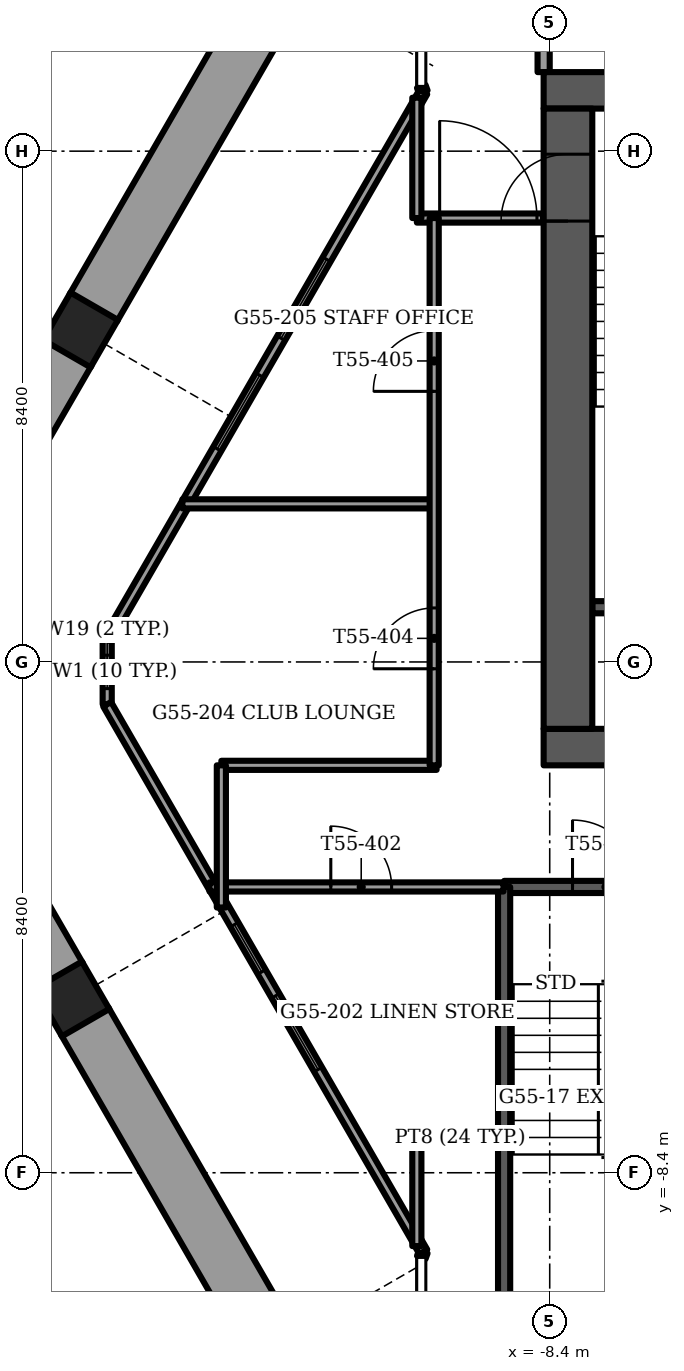
"""IFC4 building model, lengths in metres.
Left out: names, types, materials, properties, quantities, classifications, styles, units other than length and angle.
Written with IfcOpenShell. Run it as: python <this file> out.ifc"""

import sys

from ifc_helpers import new_model, si_unit, direction, frame, frame_2d, origin, origin_2d, place, context, subcontext, project, spatial, rectangle, extrude, element, fill, save


model = new_model("IFC4")
c1 = context("Model", 3, precision=1e-05, world=origin(), true_north=direction((0.0, 1.0)))
c2 = subcontext(c1, "Body", "Model", "MODEL_VIEW")
j1 = project(units=[si_unit("LENGTHUNIT", "METRE"), si_unit("PLANEANGLEUNIT", "RADIAN")], contexts=[c1])
p1 = place(None, origin())
s1 = spatial("IfcSite", under=j1, at=p1, CompositionType="ELEMENT")
p2 = place(p1, origin())
s2 = spatial("IfcBuilding", under=s1, at=p2, CompositionType="ELEMENT")
p3 = place(p2, frame((0.0, 0.0, 222.0)))
s3 = spatial("IfcBuildingStorey", under=s2, at=p3, CompositionType="ELEMENT", Elevation=222.0)
for number, where, z_axis, x_axis in (
    (1, (-16.115, 5.46, -1.2), (0.0, 0.0, 1.0), (0.5, 0.866, 0.0)),
    (2, (-16.257, -5.542, -1.2), (0.0, 0.0, 1.0), (-0.5, 0.866, 0.0)),
):
    element("IfcColumn", number, at=place(p3, frame(where, z_axis=z_axis, x_axis=x_axis)), inside=s3, PredefinedType="COLUMN", context=c2, shape_type="SweptSolid", body=[
        extrude(rectangle(XDim=0.9, YDim=0.9, at=origin_2d()), origin(), (0.0, 0.0, 1.0), 3.75),
    ])
p4 = place(p3, frame((-8.5, -1.4, -0.3), z_axis=(0.0, 0.0, 1.0), x_axis=(1.0, 0.0, 0.0)))
e3 = element("IfcWall", 3, at=p4, inside=s3, PredefinedType="SHEAR", context=c2, shape_type="SweptSolid", body=[
    extrude(rectangle(XDim=17.0, YDim=0.6, at=frame_2d((8.5, 0.0))), origin(), (0.0, 0.0, 1.0), 3.75),
])
p5 = place(p4, frame((7.7, 0.0, 0.0)))
e4 = element("IfcOpeningElement", 4, at=p5, cuts=e3, PredefinedType="OPENING", context=c2, shape_type="SweptSolid", body=[
    extrude(rectangle(XDim=1.6, YDim=2.1, at=frame_2d((0.8, 1.05))), frame((0.0, 0.3, 0.0), z_axis=(0.0, -1.0, 0.0), x_axis=(1.0, 0.0, 0.0)), (0.0, 0.0, 1.0), 0.6),
])
p6 = place(p3, frame((-8.5, 9.4, -0.3), z_axis=(0.0, 0.0, 1.0), x_axis=(1.0, 0.0, 0.0)))
e5 = element("IfcWall", 5, at=p6, inside=s3, PredefinedType="SHEAR", context=c2, shape_type="SweptSolid", body=[
    extrude(rectangle(XDim=17.0, YDim=0.6, at=frame_2d((8.5, 0.0))), origin(), (0.0, 0.0, 1.0), 3.75),
])
p7 = place(p6, frame((7.7, 0.0, 0.0)))
e6 = element("IfcOpeningElement", 6, at=p7, cuts=e5, PredefinedType="OPENING", context=c2, shape_type="SweptSolid", body=[
    extrude(rectangle(XDim=1.6, YDim=2.1, at=frame_2d((0.8, 1.05))), frame((0.0, 0.3, 0.0), z_axis=(0.0, -1.0, 0.0), x_axis=(1.0, 0.0, 0.0)), (0.0, 0.0, 1.0), 0.6),
])
p8 = place(p6, frame((1.75, 0.0, 0.0)))
e7 = element("IfcOpeningElement", 7, at=p8, cuts=e5, PredefinedType="OPENING", context=c2, shape_type="SweptSolid", body=[
    extrude(rectangle(XDim=1.1, YDim=2.1, at=frame_2d((0.55, 1.05))), frame((0.0, 0.3, 0.0), z_axis=(0.0, -1.0, 0.0), x_axis=(1.0, 0.0, 0.0)), (0.0, 0.0, 1.0), 0.6),
])
p9 = place(p6, frame((14.15, 0.0, 0.0)))
e8 = element("IfcOpeningElement", 8, at=p9, cuts=e5, PredefinedType="OPENING", context=c2, shape_type="SweptSolid", body=[
    extrude(rectangle(XDim=1.1, YDim=2.1, at=frame_2d((0.55, 1.05))), frame((0.0, 0.3, 0.0), z_axis=(0.0, -1.0, 0.0), x_axis=(1.0, 0.0, 0.0)), (0.0, 0.0, 1.0), 0.6),
])
p10 = place(p3, frame((-8.1, -1.1, -0.3), z_axis=(0.0, 0.0, 1.0), x_axis=(0.0, 1.0, 0.0)))
e9 = element("IfcWall", 9, at=p10, inside=s3, PredefinedType="SHEAR", context=c2, shape_type="SweptSolid", body=[
    extrude(rectangle(XDim=10.2, YDim=0.8, at=frame_2d((5.1, 0.0))), origin(), (0.0, 0.0, 1.0), 3.75),
])
p11 = place(p10, frame((8.35, 0.0, 0.0)))
e10 = element("IfcOpeningElement", 10, at=p11, cuts=e9, PredefinedType="OPENING", context=c2, shape_type="SweptSolid", body=[
    extrude(rectangle(XDim=1.1, YDim=2.1, at=frame_2d((0.55, 1.05))), frame((0.0, 0.4, 0.0), z_axis=(0.0, -1.0, 0.0), x_axis=(1.0, 0.0, 0.0)), (0.0, 0.0, 1.0), 0.8),
])
p12 = place(p3, frame((-12.996, 10.863, 0.0), z_axis=(0.0, 0.0, 1.0), x_axis=(-0.499997265274, -0.866026982673, 0.0)))
e11 = element("IfcWall", 11, at=p12, inside=s3, PredefinedType="PARAPET", context=c2, shape_type="SweptSolid", body=[
    extrude(rectangle(XDim=5.819, YDim=0.9, at=frame_2d((2.909, 0.0))), origin(), (0.0, 0.0, 1.0), 1.1),
])
p13 = place(p3, frame((-16.325, 5.096, 0.0), z_axis=(0.0, 0.0, 1.0), x_axis=(-0.500007442593, -0.866021106759, 0.0)))
e12 = element("IfcWall", 12, at=p13, inside=s3, PredefinedType="PARAPET", context=c2, shape_type="SweptSolid", body=[
    extrude(rectangle(XDim=5.586, YDim=0.9, at=frame_2d((2.793, 0.0))), origin(), (0.0, 0.0, 1.0), 1.1),
])
p14 = place(p3, frame((-19.119, -0.586, 0.0), z_axis=(0.0, 0.0, 1.0), x_axis=(0.500001430823, -0.866024577697, 0.0)))
e13 = element("IfcWall", 13, at=p14, inside=s3, PredefinedType="PARAPET", context=c2, shape_type="SweptSolid", body=[
    extrude(rectangle(XDim=5.303, YDim=0.9, at=frame_2d((2.651, 0.0))), origin(), (0.0, 0.0, 1.0), 1.1),
])
p15 = place(p3, frame((-16.047, -5.906, 0.0), z_axis=(0.0, 0.0, 1.0), x_axis=(0.500015433515, -0.866016493057, 0.0)))
e14 = element("IfcWall", 14, at=p15, inside=s3, PredefinedType="PARAPET", context=c2, shape_type="SweptSolid", body=[
    extrude(rectangle(XDim=5.819, YDim=0.9, at=frame_2d((2.909, 0.0))), origin(), (0.0, 0.0, 1.0), 1.1),
])
p16 = place(p3, frame((-10.479, 9.373, 0.0), z_axis=(0.0, 0.0, 1.0), x_axis=(-0.49999822861, -0.866026426494, 0.0)))
e15 = element("IfcWall", 15, at=p16, inside=s3, PredefinedType="SOLIDWALL", context=c2, shape_type="SweptSolid", body=[
    extrude(rectangle(XDim=10.396, YDim=0.15, at=frame_2d((5.198, 0.0))), origin(), (0.0, 0.0, 1.0), 3.45),
])
p17 = place(p16, frame((3.177, 0.0, 0.15)))
e16 = element("IfcOpeningElement", 16, at=p17, cuts=e15, PredefinedType="OPENING", context=c2, shape_type="SweptSolid", body=[
    extrude(rectangle(XDim=1.5, YDim=2.2, at=frame_2d((0.75, 1.1))), frame((0.0, 0.075, 0.0), z_axis=(0.0, -1.0, 0.0), x_axis=(1.0, 0.0, 0.0)), (0.0, 0.0, 1.0), 0.15),
])
p18 = place(p16, frame((5.377, 0.0, 0.15)))
e17 = element("IfcOpeningElement", 17, at=p18, cuts=e15, PredefinedType="OPENING", context=c2, shape_type="SweptSolid", body=[
    extrude(rectangle(XDim=1.4, YDim=2.2, at=frame_2d((0.7, 1.1))), frame((0.0, 0.075, 0.0), z_axis=(0.0, -1.0, 0.0), x_axis=(1.0, 0.0, 0.0)), (0.0, 0.0, 1.0), 0.15),
])
p19 = place(p3, frame((-15.677, -0.696, 0.0), z_axis=(0.0, 0.0, 1.0), x_axis=(0.49999822861, -0.866026426494, 0.0)))
e18 = element("IfcWall", 18, at=p19, inside=s3, PredefinedType="SOLIDWALL", context=c2, shape_type="SweptSolid", body=[
    extrude(rectangle(XDim=10.396, YDim=0.15, at=frame_2d((5.198, 0.0))), origin(), (0.0, 0.0, 1.0), 3.45),
])
p20 = place(p19, frame((4.183, 0.0, 0.15)))
e19 = element("IfcOpeningElement", 19, at=p20, cuts=e18, PredefinedType="OPENING", context=c2, shape_type="SweptSolid", body=[
    extrude(rectangle(XDim=0.9, YDim=2.2, at=frame_2d((0.45, 1.1))), frame((0.0, 0.075, 0.0), z_axis=(0.0, -1.0, 0.0), x_axis=(1.0, 0.0, 0.0)), (0.0, 0.0, 1.0), 0.15),
])
p21 = place(p19, frame((5.536, 0.0, 0.15)))
e20 = element("IfcOpeningElement", 20, at=p21, cuts=e18, PredefinedType="OPENING", context=c2, shape_type="SweptSolid", body=[
    extrude(rectangle(XDim=1.4, YDim=2.2, at=frame_2d((0.7, 1.1))), frame((0.0, 0.075, 0.0), z_axis=(0.0, -1.0, 0.0), x_axis=(1.0, 0.0, 0.0)), (0.0, 0.0, 1.0), 0.15),
])
p22 = place(p3, frame((-15.677, 0.369, 0.0), z_axis=(0.0, 0.0, 1.0), x_axis=(0.0, -1.0, 0.0)))
e21 = element("IfcWall", 21, at=p22, inside=s3, PredefinedType="SOLIDWALL", context=c2, shape_type="SweptSolid", body=[
    extrude(rectangle(XDim=1.065, YDim=0.15, at=frame_2d((0.533, 0.0))), origin(), (0.0, 0.0, 1.0), 3.45),
])
p23 = place(p22, frame((0.258, 0.0, 0.15)))
e22 = element("IfcOpeningElement", 22, at=p23, cuts=e21, PredefinedType="OPENING", context=c2, shape_type="SweptSolid", body=[
    extrude(rectangle(XDim=0.55, YDim=2.2, at=frame_2d((0.275, 1.1))), frame((0.0, 0.075, 0.0), z_axis=(0.0, -1.0, 0.0), x_axis=(1.0, 0.0, 0.0)), (0.0, 0.0, 1.0), 0.15),
])
p24 = place(p3, frame((-10.479, 9.373, 0.0), z_axis=(0.0, 0.0, 1.0), x_axis=(-0.337751931921, 0.941235163221, 0.0)))
e23 = element("IfcWall", 23, at=p24, inside=s3, PredefinedType="SOLIDWALL", context=c2, shape_type="SweptSolid", body=[
    extrude(rectangle(XDim=0.098, YDim=0.15, at=frame_2d((0.049, 0.0))), origin(), (0.0, 0.0, 1.0), 3.45),
])
p25 = place(p3, frame((-10.479, -9.7, 0.0), z_axis=(0.0, 0.0, 1.0), x_axis=(-0.338543167143, -0.940950861619, 0.0)))
e24 = element("IfcWall", 24, at=p25, inside=s3, PredefinedType="SOLIDWALL", context=c2, shape_type="SweptSolid", body=[
    extrude(rectangle(XDim=0.098, YDim=0.15, at=frame_2d((0.049, 0.0))), origin(), (0.0, 0.0, 1.0), 3.45),
])
p26 = place(p3, frame((-7.7, 0.9, -0.3), z_axis=(0.0, 0.0, 1.0), x_axis=(1.0, 0.0, 0.0)))
e25 = element("IfcWall", 25, at=p26, inside=s3, PredefinedType="SOLIDWALL", context=c2, shape_type="SweptSolid", body=[
    extrude(rectangle(XDim=3.25, YDim=0.2, at=frame_2d((1.625, 0.0))), origin(), (0.0, 0.0, 1.0), 3.75),
])
p27 = place(p3, frame((-9.15, -3.7, -0.3), z_axis=(0.0, 0.0, 1.0), x_axis=(1.0, 0.0, 0.0)))
e26 = element("IfcWall", 26, at=p27, inside=s3, PredefinedType="SOLIDWALL", context=c2, shape_type="SweptSolid", body=[
    extrude(rectangle(XDim=3.35, YDim=0.2, at=frame_2d((1.675, 0.0))), origin(), (0.0, 0.0, 1.0), 3.75),
])
p28 = place(p27, frame((1.125, 0.0, 0.0)))
e27 = element("IfcOpeningElement", 27, at=p28, cuts=e26, PredefinedType="OPENING", context=c2, shape_type="SweptSolid", body=[
    extrude(rectangle(XDim=1.1, YDim=2.1, at=frame_2d((0.55, 1.05))), frame((0.0, 0.1, 0.0), z_axis=(0.0, -1.0, 0.0), x_axis=(1.0, 0.0, 0.0)), (0.0, 0.0, 1.0), 0.2),
])
p29 = place(p3, frame((-9.15, -3.7, -0.3), z_axis=(0.0, 0.0, 1.0), x_axis=(0.0, -1.0, 0.0)))
e28 = element("IfcWall", 28, at=p29, inside=s3, PredefinedType="SOLIDWALL", context=c2, shape_type="SweptSolid", body=[
    extrude(rectangle(XDim=7.7, YDim=0.2, at=frame_2d((3.85, 0.0))), origin(), (0.0, 0.0, 1.0), 3.75),
])
p30 = place(p3, frame((-8.5, 9.7, 0.0), z_axis=(0.0, 0.0, 1.0), x_axis=(0.0, 1.0, 0.0)))
e29 = element("IfcWall", 29, at=p30, inside=s3, PredefinedType="PARTITIONING", context=c2, shape_type="SweptSolid", body=[
    extrude(rectangle(XDim=3.9, YDim=0.2, at=frame_2d((1.95, 0.0))), origin(), (0.0, 0.0, 1.0), 3.45),
])
p31 = place(p30, frame((1.35, 0.0, 0.0)))
e30 = element("IfcOpeningElement", 30, at=p31, cuts=e29, PredefinedType="OPENING", context=c2, shape_type="SweptSolid", body=[
    extrude(rectangle(XDim=1.2, YDim=2.1, at=frame_2d((0.6, 1.05))), frame((0.0, 0.1, 0.0), z_axis=(0.0, -1.0, 0.0), x_axis=(1.0, 0.0, 0.0)), (0.0, 0.0, 1.0), 0.2),
])
p32 = place(p3, frame((-10.585, -7.835, 0.0), z_axis=(0.0, 0.0, 1.0), x_axis=(1.0, 0.0, 0.0)))
e31 = element("IfcWall", 31, at=p32, inside=s3, PredefinedType="PARTITIONING", context=c2, shape_type="SweptSolid", body=[
    extrude(rectangle(XDim=1.425, YDim=0.15, at=frame_2d((0.712, 0.0))), origin(), (0.0, 0.0, 1.0), 3.45),
])
p33 = place(p3, frame((-13.995, -3.7, 0.0), z_axis=(0.0, 0.0, 1.0), x_axis=(1.0, 0.0, 0.0)))
e32 = element("IfcWall", 32, at=p33, inside=s3, PredefinedType="PARTITIONING", context=c2, shape_type="SweptSolid", body=[
    extrude(rectangle(XDim=4.835, YDim=0.15, at=frame_2d((2.417, 0.0))), origin(), (0.0, 0.0, 1.0), 3.45),
])
p34 = place(p33, frame((1.995, 0.0, 0.0)))
e33 = element("IfcOpeningElement", 33, at=p34, cuts=e32, PredefinedType="OPENING", context=c2, shape_type="SweptSolid", body=[
    extrude(rectangle(XDim=1.0, YDim=2.1, at=frame_2d((0.5, 1.05))), frame((0.0, 0.075, 0.0), z_axis=(0.0, -1.0, 0.0), x_axis=(1.0, 0.0, 0.0)), (0.0, 0.0, 1.0), 0.15),
])
p35 = place(p3, frame((-13.8, -1.7, 0.0), z_axis=(0.0, 0.0, 1.0), x_axis=(1.0, 0.0, 0.0)))
e34 = element("IfcWall", 34, at=p35, inside=s3, PredefinedType="PARTITIONING", context=c2, shape_type="SweptSolid", body=[
    extrude(rectangle(XDim=3.54, YDim=0.15, at=frame_2d((1.77, 0.0))), origin(), (0.0, 0.0, 1.0), 3.45),
])
p36 = place(p3, frame((-14.441, 2.6, 0.0), z_axis=(0.0, 0.0, 1.0), x_axis=(1.0, 0.0, 0.0)))
e35 = element("IfcWall", 35, at=p36, inside=s3, PredefinedType="PARTITIONING", context=c2, shape_type="SweptSolid", body=[
    extrude(rectangle(XDim=4.141, YDim=0.15, at=frame_2d((2.07, 0.0))), origin(), (0.0, 0.0, 1.0), 3.45),
])
p37 = place(p3, frame((-10.585, 7.3, 0.0), z_axis=(0.0, 0.0, 1.0), x_axis=(1.0, 0.0, 0.0)))
e36 = element("IfcWall", 36, at=p37, inside=s3, PredefinedType="PARTITIONING", context=c2, shape_type="SweptSolid", body=[
    extrude(rectangle(XDim=2.075, YDim=0.15, at=frame_2d((1.038, 0.0))), origin(), (0.0, 0.0, 1.0), 3.45),
])
p38 = place(p37, frame((0.375, 0.0, 0.0)))
e37 = element("IfcOpeningElement", 37, at=p38, cuts=e36, PredefinedType="OPENING", context=c2, shape_type="SweptSolid", body=[
    extrude(rectangle(XDim=1.6, YDim=2.1, at=frame_2d((0.8, 1.05))), frame((0.0, 0.075, 0.0), z_axis=(0.0, -1.0, 0.0), x_axis=(1.0, 0.0, 0.0)), (0.0, 0.0, 1.0), 0.15),
])
p39 = place(p3, frame((-10.3, -1.7, 0.0), z_axis=(0.0, 0.0, 1.0), x_axis=(0.0, 1.0, 0.0)))
e38 = element("IfcWall", 38, at=p39, inside=s3, PredefinedType="PARTITIONING", context=c2, shape_type="SweptSolid", body=[
    extrude(rectangle(XDim=9.0, YDim=0.15, at=frame_2d((4.5, 0.0))), origin(), (0.0, 0.0, 1.0), 3.45),
])
p40 = place(p39, frame((1.588, 0.0, 0.0)))
e39 = element("IfcOpeningElement", 39, at=p40, cuts=e38, PredefinedType="OPENING", context=c2, shape_type="SweptSolid", body=[
    extrude(rectangle(XDim=1.0, YDim=2.1, at=frame_2d((0.5, 1.05))), frame((0.0, 0.075, 0.0), z_axis=(0.0, -1.0, 0.0), x_axis=(1.0, 0.0, 0.0)), (0.0, 0.0, 1.0), 0.15),
])
p41 = place(p39, frame((6.15, 0.0, 0.0)))
e40 = element("IfcOpeningElement", 40, at=p41, cuts=e38, PredefinedType="OPENING", context=c2, shape_type="SweptSolid", body=[
    extrude(rectangle(XDim=1.0, YDim=2.1, at=frame_2d((0.5, 1.05))), frame((0.0, 0.075, 0.0), z_axis=(0.0, -1.0, 0.0), x_axis=(1.0, 0.0, 0.0)), (0.0, 0.0, 1.0), 0.15),
])
p42 = place(p3, frame((-10.585, -9.606, 0.0), z_axis=(0.0, 0.0, 1.0), x_axis=(0.0, 1.0, 0.0)))
e41 = element("IfcWall", 41, at=p42, inside=s3, PredefinedType="PARTITIONING", context=c2, shape_type="SweptSolid", body=[
    extrude(rectangle(XDim=1.771, YDim=0.15, at=frame_2d((0.885, 0.0))), origin(), (0.0, 0.0, 1.0), 3.45),
])
p43 = place(p3, frame((-10.585, 7.3, 0.0), z_axis=(0.0, 0.0, 1.0), x_axis=(0.0, 1.0, 0.0)))
e42 = element("IfcWall", 42, at=p43, inside=s3, PredefinedType="PARTITIONING", context=c2, shape_type="SweptSolid", body=[
    extrude(rectangle(XDim=1.979, YDim=0.15, at=frame_2d((0.99, 0.0))), origin(), (0.0, 0.0, 1.0), 3.45),
])
p44 = place(p3, frame((-13.8, -4.038, 0.0), z_axis=(0.0, 0.0, 1.0), x_axis=(0.0, 1.0, 0.0)))
e43 = element("IfcWall", 43, at=p44, inside=s3, PredefinedType="PARTITIONING", context=c2, shape_type="SweptSolid", body=[
    extrude(rectangle(XDim=2.338, YDim=0.15, at=frame_2d((1.169, 0.0))), origin(), (0.0, 0.0, 1.0), 3.45),
])
p45 = place(p17, origin())
e44 = element("IfcWindow", 44, at=p45, inside=s3, PartitioningType="SINGLE_PANEL", PredefinedType="WINDOW", context=c2, shape_type="SweptSolid", body=[
    extrude(rectangle(XDim=1.5, YDim=2.2, at=frame_2d((0.75, 1.1))), frame((0.0, 0.03, 0.0), z_axis=(0.0, -1.0, 0.0), x_axis=(1.0, 0.0, 0.0)), (0.0, 0.0, 1.0), 0.06),
])
fill(e16, e44)
p46 = place(p18, origin())
e45 = element("IfcWindow", 45, at=p46, inside=s3, PartitioningType="SINGLE_PANEL", PredefinedType="WINDOW", context=c2, shape_type="SweptSolid", body=[
    extrude(rectangle(XDim=1.4, YDim=2.2, at=frame_2d((0.7, 1.1))), frame((0.0, 0.03, 0.0), z_axis=(0.0, -1.0, 0.0), x_axis=(1.0, 0.0, 0.0)), (0.0, 0.0, 1.0), 0.06),
])
fill(e17, e45)
p47 = place(p20, origin())
e46 = element("IfcWindow", 46, at=p47, inside=s3, PartitioningType="SINGLE_PANEL", PredefinedType="WINDOW", context=c2, shape_type="SweptSolid", body=[
    extrude(rectangle(XDim=0.9, YDim=2.2, at=frame_2d((0.45, 1.1))), frame((0.0, 0.03, 0.0), z_axis=(0.0, -1.0, 0.0), x_axis=(1.0, 0.0, 0.0)), (0.0, 0.0, 1.0), 0.06),
])
fill(e19, e46)
p48 = place(p21, origin())
e47 = element("IfcWindow", 47, at=p48, inside=s3, PartitioningType="SINGLE_PANEL", PredefinedType="WINDOW", context=c2, shape_type="SweptSolid", body=[
    extrude(rectangle(XDim=1.4, YDim=2.2, at=frame_2d((0.7, 1.1))), frame((0.0, 0.03, 0.0), z_axis=(0.0, -1.0, 0.0), x_axis=(1.0, 0.0, 0.0)), (0.0, 0.0, 1.0), 0.06),
])
fill(e20, e47)
p49 = place(p23, origin())
e48 = element("IfcWindow", 48, at=p49, inside=s3, PartitioningType="SINGLE_PANEL", PredefinedType="WINDOW", context=c2, shape_type="SweptSolid", body=[
    extrude(rectangle(XDim=0.55, YDim=2.2, at=frame_2d((0.275, 1.1))), frame((0.0, 0.03, 0.0), z_axis=(0.0, -1.0, 0.0), x_axis=(1.0, 0.0, 0.0)), (0.0, 0.0, 1.0), 0.06),
])
fill(e22, e48)
p50 = place(p11, origin())
e49 = element("IfcDoor", 49, at=p50, inside=s3, OperationType="SINGLE_SWING_RIGHT", PredefinedType="DOOR", context=c2, shape_type="SweptSolid", body=[
    extrude(rectangle(XDim=1.1, YDim=2.1, at=frame_2d((0.55, 1.05))), frame((0.0, 0.025, 0.0), z_axis=(0.0, -1.0, 0.0), x_axis=(1.0, 0.0, 0.0)), (0.0, 0.0, 1.0), 0.05),
])
fill(e10, e49)
p51 = place(p28, origin())
e50 = element("IfcDoor", 50, at=p51, inside=s3, OperationType="SINGLE_SWING_LEFT", PredefinedType="DOOR", context=c2, shape_type="SweptSolid", body=[
    extrude(rectangle(XDim=1.1, YDim=2.1, at=frame_2d((0.55, 1.05))), frame((0.0, 0.025, 0.0), z_axis=(0.0, -1.0, 0.0), x_axis=(1.0, 0.0, 0.0)), (0.0, 0.0, 1.0), 0.05),
])
fill(e27, e50)
p52 = place(p34, origin())
e51 = element("IfcDoor", 51, at=p52, inside=s3, OperationType="SINGLE_SWING_RIGHT", PredefinedType="DOOR", context=c2, shape_type="SweptSolid", body=[
    extrude(rectangle(XDim=1.0, YDim=2.1, at=frame_2d((0.5, 1.05))), frame((0.0, 0.025, 0.0), z_axis=(0.0, -1.0, 0.0), x_axis=(1.0, 0.0, 0.0)), (0.0, 0.0, 1.0), 0.05),
])
fill(e33, e51)
p53 = place(p40, origin())
e52 = element("IfcDoor", 52, at=p53, inside=s3, OperationType="SINGLE_SWING_RIGHT", PredefinedType="DOOR", context=c2, shape_type="SweptSolid", body=[
    extrude(rectangle(XDim=1.0, YDim=2.1, at=frame_2d((0.5, 1.05))), frame((0.0, 0.025, 0.0), z_axis=(0.0, -1.0, 0.0), x_axis=(1.0, 0.0, 0.0)), (0.0, 0.0, 1.0), 0.05),
])
fill(e39, e52)
p54 = place(p41, origin())
e53 = element("IfcDoor", 53, at=p54, inside=s3, OperationType="SINGLE_SWING_LEFT", PredefinedType="DOOR", context=c2, shape_type="SweptSolid", body=[
    extrude(rectangle(XDim=1.0, YDim=2.1, at=frame_2d((0.5, 1.05))), frame((0.0, 0.025, 0.0), z_axis=(0.0, -1.0, 0.0), x_axis=(1.0, 0.0, 0.0)), (0.0, 0.0, 1.0), 0.05),
])
fill(e40, e53)
p55 = place(p38, origin())
e54 = element("IfcDoor", 54, at=p55, inside=s3, OperationType="DOUBLE_DOOR_SINGLE_SWING", PredefinedType="DOOR", context=c2, shape_type="SweptSolid", body=[
    extrude(rectangle(XDim=1.6, YDim=2.1, at=frame_2d((0.8, 1.05))), frame((0.0, 0.025, 0.0), z_axis=(0.0, -1.0, 0.0), x_axis=(1.0, 0.0, 0.0)), (0.0, 0.0, 1.0), 0.05),
])
fill(e37, e54)
save(model, sys.argv[1])
